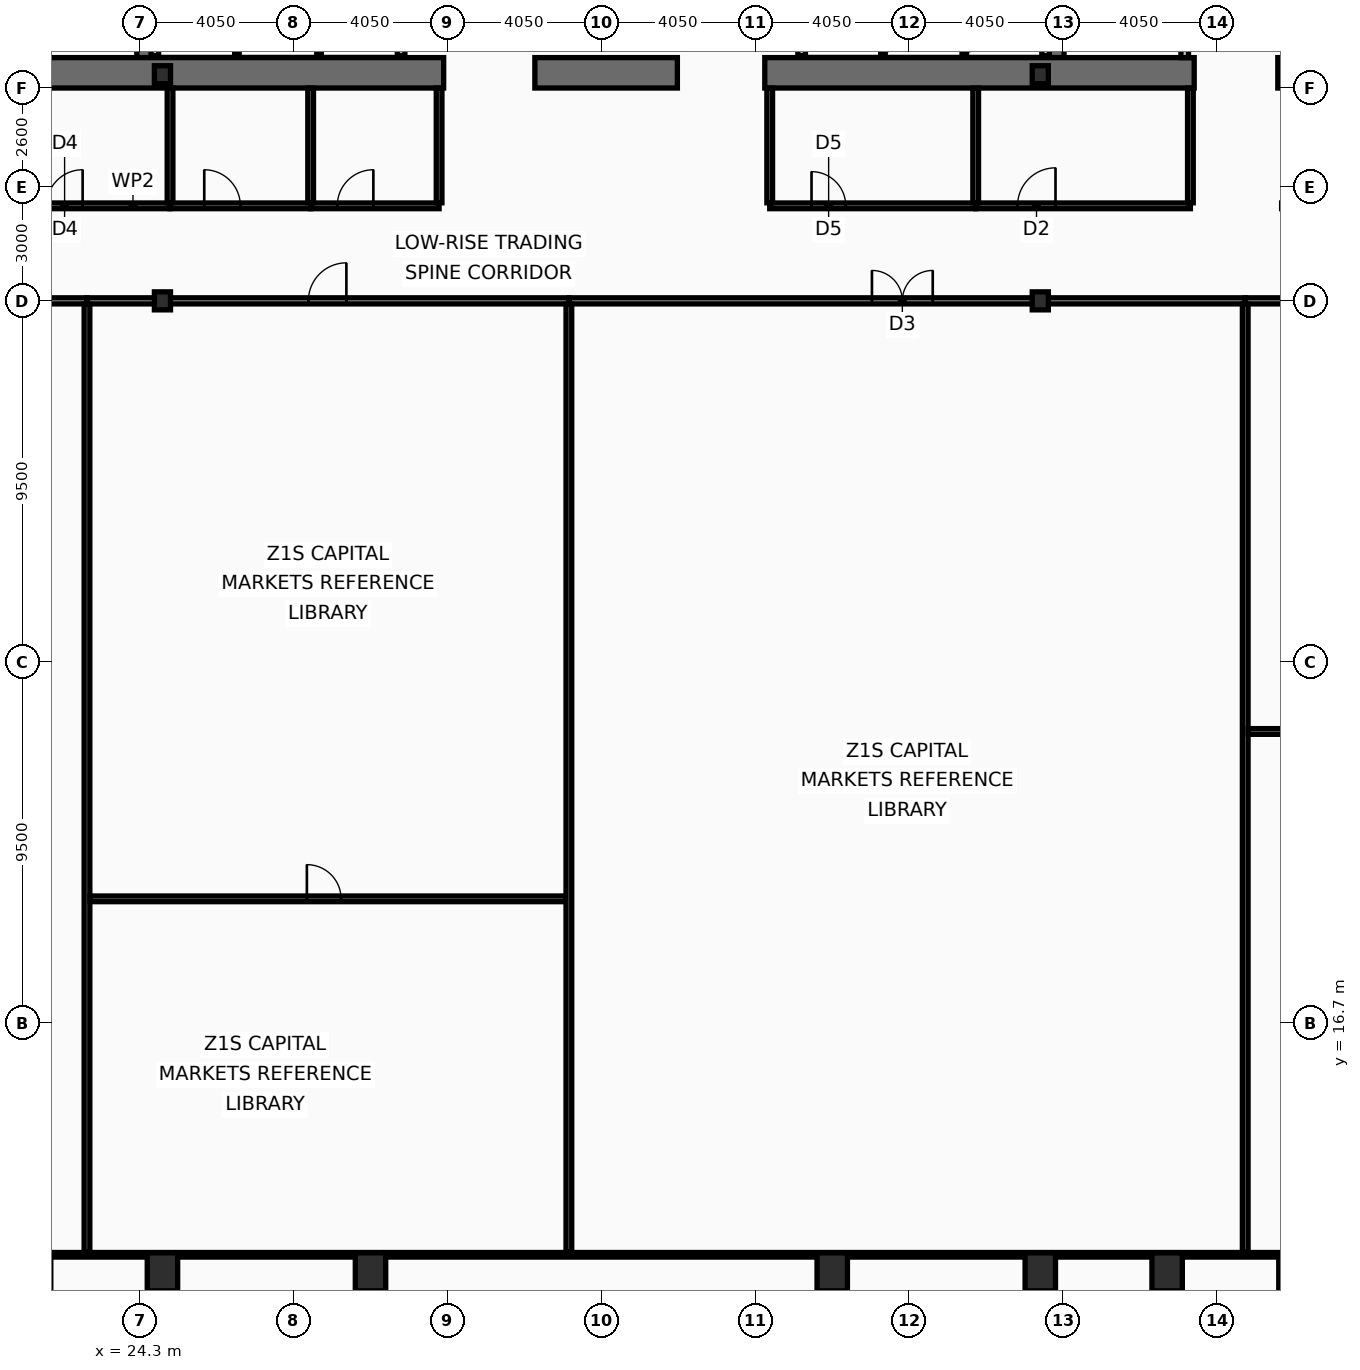
"""IFC4 building model, lengths in metres.
Left out: names, types, materials, properties, quantities, classifications, styles, units other than length and angle.
Written with IfcOpenShell. Run it as: python <this file> out.ifc"""

import sys

from ifc_helpers import new_model, si_unit, direction, frame, frame_2d, origin, origin_2d, place, context, subcontext, project, spatial, rectangle, hollow_rectangle, i_section, extrude, element, fill, save


model = new_model("IFC4")
c1 = context("Model", 3, precision=1e-05, world=origin(), true_north=direction((0.0, 1.0)))
c2 = subcontext(c1, "Body", "Model", "MODEL_VIEW")
j1 = project(units=[si_unit("LENGTHUNIT", "METRE"), si_unit("PLANEANGLEUNIT", "RADIAN")], contexts=[c1])
p1 = place(None, origin())
s1 = spatial("IfcSite", under=j1, at=p1, CompositionType="ELEMENT")
p2 = place(p1, origin())
s2 = spatial("IfcBuilding", under=s1, at=p2, CompositionType="ELEMENT")
p3 = place(p2, frame((0.0, 0.0, 49.8)))
s3 = spatial("IfcBuildingStorey", under=s2, at=p3, CompositionType="ELEMENT", Elevation=49.8)
for number, where, z_axis, x_axis in (
    (1, (24.45, 42.1, 0.0), (0.0, 0.0, 1.0), (0.0, 1.0, 0.0)),
    (2, (48.4, 42.1, 0.0), (0.0, 0.0, 1.0), (0.0, 1.0, 0.0)),
):
    element("IfcWall", number, at=place(p3, frame(where, z_axis=z_axis, x_axis=x_axis)), inside=s3, PredefinedType="SHEAR", context=c2, shape_type="SweptSolid", body=[
        extrude(rectangle(XDim=10.8, YDim=0.45, at=frame_2d((5.4, 0.0))), origin(), (0.0, 0.0, 1.0), 3.82),
    ])
p4 = place(p3, frame((32.3, 41.7, 0.0), z_axis=(0.0, 0.0, 1.0), x_axis=(-1.0, 0.0, 0.0)))
e3 = element("IfcWall", 3, at=p4, inside=s3, PredefinedType="SHEAR", context=c2, shape_type="SweptSolid", body=[
    extrude(rectangle(XDim=11.45, YDim=0.8, at=frame_2d((5.725, 0.0))), origin(), (0.0, 0.0, 1.0), 3.82),
])
p5 = place(p3, frame((38.45, 41.7, 0.0), z_axis=(0.0, 0.0, 1.0), x_axis=(-1.0, 0.0, 0.0)))
e4 = element("IfcWall", 4, at=p5, inside=s3, PredefinedType="SHEAR", context=c2, shape_type="SweptSolid", body=[
    extrude(rectangle(XDim=3.75, YDim=0.8, at=frame_2d((1.875, 0.0))), origin(), (0.0, 0.0, 1.0), 3.82),
])
p6 = place(p3, frame((52.05, 41.7, 0.0), z_axis=(0.0, 0.0, 1.0), x_axis=(-1.0, 0.0, 0.0)))
e5 = element("IfcWall", 5, at=p6, inside=s3, PredefinedType="SHEAR", context=c2, shape_type="SweptSolid", body=[
    extrude(rectangle(XDim=11.3, YDim=0.8, at=frame_2d((5.65, 0.0))), origin(), (0.0, 0.0, 1.0), 3.82),
])
p7 = place(p3, frame((56.7, 41.7, 0.0), z_axis=(0.0, 0.0, 1.0), x_axis=(-1.0, 0.0, 0.0)))
e6 = element("IfcWall", 6, at=p7, inside=s3, PredefinedType="SHEAR", context=c2, shape_type="SweptSolid", body=[
    extrude(rectangle(XDim=2.45, YDim=0.8, at=frame_2d((1.225, 0.0))), origin(), (0.0, 0.0, 1.0), 3.82),
])
for number, where, z_axis, x_axis in (
    (7, (24.9, 10.15, 0.0), (0.0, 0.0, 1.0), (1.0, 0.0, 0.0)),
    (8, (30.375, 10.15, 0.0), (0.0, 0.0, 1.0), (1.0, 0.0, 0.0)),
    (9, (42.525, 10.15, 0.0), (0.0, 0.0, 1.0), (1.0, 0.0, 0.0)),
    (10, (48.0, 10.15, 0.0), (0.0, 0.0, 1.0), (1.0, 0.0, 0.0)),
    (11, (51.337, 10.15, 0.0), (0.0, 0.0, 1.0), (1.0, 0.0, 0.0)),
    (12, (54.675, 10.15, 0.0), (0.0, 0.0, 1.0), (1.0, 0.0, 0.0)),
):
    element("IfcColumn", number, at=place(p3, frame(where, z_axis=z_axis, x_axis=x_axis)), inside=s3, PredefinedType="COLUMN", context=c2, shape_type="SweptSolid", body=[
        extrude(hollow_rectangle(XDim=0.8, YDim=1.0, WallThickness=0.055, at=origin_2d()), origin(), (0.0, 0.0, 1.0), 4.0),
    ])
for number, where, z_axis, x_axis in (
    (13, (24.9, 35.7, 0.0), (0.0, 0.0, 1.0), (1.0, 0.0, 0.0)),
    (14, (24.9, 41.65, 0.0), (0.0, 0.0, 1.0), (1.0, 0.0, 0.0)),
    (15, (48.0, 35.7, 0.0), (0.0, 0.0, 1.0), (1.0, 0.0, 0.0)),
    (16, (48.0, 41.65, 0.0), (0.0, 0.0, 1.0), (1.0, 0.0, 0.0)),
):
    element("IfcColumn", number, at=place(p3, frame(where, z_axis=z_axis, x_axis=x_axis)), inside=s3, PredefinedType="COLUMN", context=c2, shape_type="SweptSolid", body=[
        extrude(i_section(OverallWidth=0.424, OverallDepth=0.474, WebThickness=0.048, FlangeThickness=0.077, at=origin_2d()), origin(), (0.0, 0.0, 1.0), 4.0),
    ])
p8 = place(p3, frame((51.8, 42.1, 0.0), z_axis=(0.0, 0.0, 1.0), x_axis=(0.0, 1.0, 0.0)))
e17 = element("IfcWall", 17, at=p8, inside=s3, PredefinedType="PARTITIONING", context=c2, shape_type="SweptSolid", body=[
    extrude(rectangle(XDim=2.395, YDim=0.2, at=frame_2d((1.198, 0.0))), origin(), (0.0, 0.0, 1.0), 3.82),
])
p9 = place(p8, frame((0.38, 0.0, 0.0)))
e18 = element("IfcOpeningElement", 18, at=p9, cuts=e17, PredefinedType="OPENING", context=c2, shape_type="SweptSolid", body=[
    extrude(rectangle(XDim=1.05, YDim=2.15, at=frame_2d((0.525, 1.075))), frame((0.0, 0.11, 0.0), z_axis=(0.0, -1.0, 0.0), x_axis=(1.0, 0.0, 0.0)), (0.0, 0.0, 1.0), 0.22),
])
for number, where, z_axis, x_axis in (
    (19, (24.7, 42.15, 0.0), (0.0, 0.0, 1.0), (0.0, 1.0, 0.0)),
    (20, (31.18, 42.15, 0.0), (0.0, 0.0, 1.0), (0.0, 1.0, 0.0)),
):
    element("IfcWall", number, at=place(p3, frame(where, z_axis=z_axis, x_axis=x_axis)), inside=s3, PredefinedType="PARTITIONING", context=c2, shape_type="SweptSolid", body=[
        extrude(rectangle(XDim=2.095, YDim=0.2, at=frame_2d((1.048, 0.0))), origin(), (0.0, 0.0, 1.0), 3.82),
    ])
for number, where, z_axis, x_axis in (
    (21, (26.86, 42.15, 0.0), (0.0, 0.0, 1.0), (0.0, 1.0, 0.0)),
    (22, (29.02, 42.15, 0.0), (0.0, 0.0, 1.0), (0.0, 1.0, 0.0)),
):
    element("IfcWall", number, at=place(p3, frame(where, z_axis=z_axis, x_axis=x_axis)), inside=s3, PredefinedType="PARTITIONING", context=c2, shape_type="SweptSolid", body=[
        extrude(rectangle(XDim=2.095, YDim=0.12, at=frame_2d((1.048, 0.0))), origin(), (0.0, 0.0, 1.0), 3.82),
    ])
for number, where, z_axis, x_axis in (
    (23, (41.72, 42.15, 0.0), (0.0, 0.0, 1.0), (0.0, 1.0, 0.0)),
    (24, (48.14, 42.15, 0.0), (0.0, 0.0, 1.0), (0.0, 1.0, 0.0)),
):
    element("IfcWall", number, at=place(p3, frame(where, z_axis=z_axis, x_axis=x_axis)), inside=s3, PredefinedType="PARTITIONING", context=c2, shape_type="SweptSolid", body=[
        extrude(rectangle(XDim=2.095, YDim=0.2, at=frame_2d((1.048, 0.0))), origin(), (0.0, 0.0, 1.0), 3.82),
    ])
for number, where, z_axis, x_axis in (
    (25, (43.86, 42.15, 0.0), (0.0, 0.0, 1.0), (0.0, 1.0, 0.0)),
    (26, (46.0, 42.15, 0.0), (0.0, 0.0, 1.0), (0.0, 1.0, 0.0)),
):
    element("IfcWall", number, at=place(p3, frame(where, z_axis=z_axis, x_axis=x_axis)), inside=s3, PredefinedType="PARTITIONING", context=c2, shape_type="SweptSolid", body=[
        extrude(rectangle(XDim=2.095, YDim=0.12, at=frame_2d((1.048, 0.0))), origin(), (0.0, 0.0, 1.0), 3.82),
    ])
p10 = place(p3, frame((20.95, 38.2, 0.0), z_axis=(0.0, 0.0, 1.0), x_axis=(1.0, 0.0, 0.0)))
e27 = element("IfcWall", 27, at=p10, inside=s3, PredefinedType="PARTITIONING", context=c2, shape_type="SweptSolid", body=[
    extrude(rectangle(XDim=4.15, YDim=0.15, at=frame_2d((2.075, 0.0))), origin(), (0.0, 0.0, 1.0), 3.01),
])
p11 = place(p10, frame((0.9, 0.0, 0.0)))
e28 = element("IfcOpeningElement", 28, at=p11, cuts=e27, PredefinedType="OPENING", context=c2, shape_type="SweptSolid", body=[
    extrude(rectangle(XDim=0.95, YDim=2.05, at=frame_2d((0.475, 1.025))), frame((0.0, 0.085, 0.0), z_axis=(0.0, -1.0, 0.0), x_axis=(1.0, 0.0, 0.0)), (0.0, 0.0, 1.0), 0.17),
])
p12 = place(p3, frame((25.1, 38.2, 0.0), z_axis=(0.0, 0.0, 1.0), x_axis=(1.0, 0.0, 0.0)))
e29 = element("IfcWall", 29, at=p12, inside=s3, PredefinedType="PARTITIONING", context=c2, shape_type="SweptSolid", body=[
    extrude(rectangle(XDim=3.7, YDim=0.15, at=frame_2d((1.85, 0.0))), origin(), (0.0, 0.0, 1.0), 3.01),
])
p13 = place(p12, frame((0.9, 0.0, 0.0)))
e30 = element("IfcOpeningElement", 30, at=p13, cuts=e29, PredefinedType="OPENING", context=c2, shape_type="SweptSolid", body=[
    extrude(rectangle(XDim=0.95, YDim=2.05, at=frame_2d((0.475, 1.025))), frame((0.0, 0.085, 0.0), z_axis=(0.0, -1.0, 0.0), x_axis=(1.0, 0.0, 0.0)), (0.0, 0.0, 1.0), 0.17),
])
p14 = place(p3, frame((28.8, 38.2, 0.0), z_axis=(0.0, 0.0, 1.0), x_axis=(1.0, 0.0, 0.0)))
e31 = element("IfcWall", 31, at=p14, inside=s3, PredefinedType="PARTITIONING", context=c2, shape_type="SweptSolid", body=[
    extrude(rectangle(XDim=3.38, YDim=0.15, at=frame_2d((1.69, 0.0))), origin(), (0.0, 0.0, 1.0), 3.01),
])
p15 = place(p14, frame((0.7, 0.0, 0.0)))
e32 = element("IfcOpeningElement", 32, at=p15, cuts=e31, PredefinedType="OPENING", context=c2, shape_type="SweptSolid", body=[
    extrude(rectangle(XDim=0.95, YDim=2.05, at=frame_2d((0.475, 1.025))), frame((0.0, 0.085, 0.0), z_axis=(0.0, -1.0, 0.0), x_axis=(1.0, 0.0, 0.0)), (0.0, 0.0, 1.0), 0.17),
])
p16 = place(p3, frame((25.1, 38.28, 0.0), z_axis=(0.0, 0.0, 1.0), x_axis=(0.0, 1.0, 0.0)))
e33 = element("IfcWall", 33, at=p16, inside=s3, PredefinedType="PARTITIONING", context=c2, shape_type="SweptSolid", body=[
    extrude(rectangle(XDim=3.02, YDim=0.15, at=frame_2d((1.51, 0.0))), origin(), (0.0, 0.0, 1.0), 3.01),
])
for number, where, z_axis, x_axis in (
    (34, (28.8, 38.28, 0.0), (0.0, 0.0, 1.0), (0.0, 1.0, 0.0)),
    (35, (32.18, 38.28, 0.0), (0.0, 0.0, 1.0), (0.0, 1.0, 0.0)),
):
    element("IfcWall", number, at=place(p3, frame(where, z_axis=z_axis, x_axis=x_axis)), inside=s3, PredefinedType="PARTITIONING", context=c2, shape_type="SweptSolid", body=[
        extrude(rectangle(XDim=3.02, YDim=0.15, at=frame_2d((1.51, 0.0))), origin(), (0.0, 0.0, 1.0), 3.82),
    ])
p17 = place(p3, frame((40.88, 38.2, 0.0), z_axis=(0.0, 0.0, 1.0), x_axis=(1.0, 0.0, 0.0)))
e36 = element("IfcWall", 36, at=p17, inside=s3, PredefinedType="PARTITIONING", context=c2, shape_type="SweptSolid", body=[
    extrude(rectangle(XDim=5.42, YDim=0.15, at=frame_2d((2.71, 0.0))), origin(), (0.0, 0.0, 1.0), 3.01),
])
p18 = place(p17, frame((1.1, 0.0, 0.0)))
e37 = element("IfcOpeningElement", 37, at=p18, cuts=e36, PredefinedType="OPENING", context=c2, shape_type="SweptSolid", body=[
    extrude(rectangle(XDim=0.9, YDim=2.05, at=frame_2d((0.45, 1.025))), frame((0.0, 0.085, 0.0), z_axis=(0.0, -1.0, 0.0), x_axis=(1.0, 0.0, 0.0)), (0.0, 0.0, 1.0), 0.17),
])
p19 = place(p3, frame((46.3, 38.2, 0.0), z_axis=(0.0, 0.0, 1.0), x_axis=(1.0, 0.0, 0.0)))
e38 = element("IfcWall", 38, at=p19, inside=s3, PredefinedType="PARTITIONING", context=c2, shape_type="SweptSolid", body=[
    extrude(rectangle(XDim=5.65, YDim=0.15, at=frame_2d((2.825, 0.0))), origin(), (0.0, 0.0, 1.0), 3.01),
])
p20 = place(p19, frame((1.1, 0.0, 0.0)))
e39 = element("IfcOpeningElement", 39, at=p20, cuts=e38, PredefinedType="OPENING", context=c2, shape_type="SweptSolid", body=[
    extrude(rectangle(XDim=1.0, YDim=2.05, at=frame_2d((0.5, 1.025))), frame((0.0, 0.085, 0.0), z_axis=(0.0, -1.0, 0.0), x_axis=(1.0, 0.0, 0.0)), (0.0, 0.0, 1.0), 0.17),
])
for number, where, z_axis, x_axis in (
    (40, (40.88, 38.28, 0.0), (0.0, 0.0, 1.0), (0.0, 1.0, 0.0)),
    (41, (46.3, 38.28, 0.0), (0.0, 0.0, 1.0), (0.0, 1.0, 0.0)),
    (42, (51.95, 38.28, 0.0), (0.0, 0.0, 1.0), (0.0, 1.0, 0.0)),
):
    element("IfcWall", number, at=place(p3, frame(where, z_axis=z_axis, x_axis=x_axis)), inside=s3, PredefinedType="PARTITIONING", context=c2, shape_type="SweptSolid", body=[
        extrude(rectangle(XDim=3.02, YDim=0.15, at=frame_2d((1.51, 0.0))), origin(), (0.0, 0.0, 1.0), 3.82),
    ])
p21 = place(p3, frame((10.4, 35.7, 0.0), z_axis=(0.0, 0.0, 1.0), x_axis=(1.0, 0.0, 0.0)))
e43 = element("IfcWall", 43, at=p21, inside=s3, PredefinedType="PARTITIONING", context=c2, shape_type="SweptSolid", body=[
    extrude(rectangle(XDim=12.514, YDim=0.16, at=frame_2d((6.257, 0.0))), origin(), (0.0, 0.0, 1.0), 3.01),
])
p22 = place(p21, frame((5.756, 0.0, 0.0)))
e44 = element("IfcOpeningElement", 44, at=p22, cuts=e43, PredefinedType="OPENING", context=c2, shape_type="SweptSolid", body=[
    extrude(rectangle(XDim=1.0, YDim=2.05, at=frame_2d((0.5, 1.025))), frame((0.0, 0.09, 0.0), z_axis=(0.0, -1.0, 0.0), x_axis=(1.0, 0.0, 0.0)), (0.0, 0.0, 1.0), 0.18),
])
p23 = place(p3, frame((22.914, 35.7, 0.0), z_axis=(0.0, 0.0, 1.0), x_axis=(1.0, 0.0, 0.0)))
e45 = element("IfcWall", 45, at=p23, inside=s3, PredefinedType="PARTITIONING", context=c2, shape_type="SweptSolid", body=[
    extrude(rectangle(XDim=12.681, YDim=0.16, at=frame_2d((6.34, 0.0))), origin(), (0.0, 0.0, 1.0), 3.01),
])
p24 = place(p23, frame((5.826, 0.0, 0.0)))
e46 = element("IfcOpeningElement", 46, at=p24, cuts=e45, PredefinedType="OPENING", context=c2, shape_type="SweptSolid", body=[
    extrude(rectangle(XDim=1.0, YDim=2.05, at=frame_2d((0.5, 1.025))), frame((0.0, 0.09, 0.0), z_axis=(0.0, -1.0, 0.0), x_axis=(1.0, 0.0, 0.0)), (0.0, 0.0, 1.0), 0.18),
])
p25 = place(p3, frame((22.914, 10.665, 0.0), z_axis=(0.0, 0.0, 1.0), x_axis=(0.0, 1.0, 0.0)))
e47 = element("IfcWall", 47, at=p25, inside=s3, PredefinedType="PARTITIONING", context=c2, shape_type="SweptSolid", body=[
    extrude(rectangle(XDim=24.95, YDim=0.15, at=frame_2d((12.475, 0.0))), origin(), (0.0, 0.0, 1.0), 3.21),
])
p26 = place(p3, frame((22.994, 19.966, 0.0), z_axis=(0.0, 0.0, 1.0), x_axis=(1.0, 0.0, 0.0)))
e48 = element("IfcWall", 48, at=p26, inside=s3, PredefinedType="PARTITIONING", context=c2, shape_type="SweptSolid", body=[
    extrude(rectangle(XDim=12.521, YDim=0.15, at=frame_2d((6.26, 0.0))), origin(), (0.0, 0.0, 1.0), 3.01),
])
p27 = place(p26, frame((5.706, 0.0, 0.0)))
e49 = element("IfcOpeningElement", 49, at=p27, cuts=e48, PredefinedType="OPENING", context=c2, shape_type="SweptSolid", body=[
    extrude(rectangle(XDim=0.9, YDim=2.05, at=frame_2d((0.45, 1.025))), frame((0.0, 0.085, 0.0), z_axis=(0.0, -1.0, 0.0), x_axis=(1.0, 0.0, 0.0)), (0.0, 0.0, 1.0), 0.17),
])
p28 = place(p3, frame((35.595, 35.7, 0.0), z_axis=(0.0, 0.0, 1.0), x_axis=(1.0, 0.0, 0.0)))
e50 = element("IfcWall", 50, at=p28, inside=s3, PredefinedType="PARTITIONING", context=c2, shape_type="SweptSolid", body=[
    extrude(rectangle(XDim=17.797, YDim=0.16, at=frame_2d((8.899, 0.0))), origin(), (0.0, 0.0, 1.0), 3.01),
])
p29 = place(p28, frame((7.975, 0.0, 0.0)))
e51 = element("IfcOpeningElement", 51, at=p29, cuts=e50, PredefinedType="OPENING", context=c2, shape_type="SweptSolid", body=[
    extrude(rectangle(XDim=1.6, YDim=2.15, at=frame_2d((0.8, 1.075))), frame((0.0, 0.09, 0.0), z_axis=(0.0, -1.0, 0.0), x_axis=(1.0, 0.0, 0.0)), (0.0, 0.0, 1.0), 0.18),
])
p30 = place(p3, frame((35.595, 10.665, 0.0), z_axis=(0.0, 0.0, 1.0), x_axis=(0.0, 1.0, 0.0)))
e52 = element("IfcWall", 52, at=p30, inside=s3, PredefinedType="PARTITIONING", context=c2, shape_type="SweptSolid", body=[
    extrude(rectangle(XDim=24.95, YDim=0.15, at=frame_2d((12.475, 0.0))), origin(), (0.0, 0.0, 1.0), 3.21),
])
p31 = place(p3, frame((53.392, 35.7, 0.0), z_axis=(0.0, 0.0, 1.0), x_axis=(1.0, 0.0, 0.0)))
e53 = element("IfcWall", 53, at=p31, inside=s3, PredefinedType="PARTITIONING", context=c2, shape_type="SweptSolid", body=[
    extrude(rectangle(XDim=8.51, YDim=0.16, at=frame_2d((4.255, 0.0))), origin(), (0.0, 0.0, 1.0), 3.01),
])
p32 = place(p31, frame((4.074, 0.0, 0.0)))
e54 = element("IfcOpeningElement", 54, at=p32, cuts=e53, PredefinedType="OPENING", context=c2, shape_type="SweptSolid", body=[
    extrude(rectangle(XDim=1.0, YDim=2.05, at=frame_2d((0.5, 1.025))), frame((0.0, 0.09, 0.0), z_axis=(0.0, -1.0, 0.0), x_axis=(1.0, 0.0, 0.0)), (0.0, 0.0, 1.0), 0.18),
])
p33 = place(p3, frame((53.392, 10.665, 0.0), z_axis=(0.0, 0.0, 1.0), x_axis=(0.0, 1.0, 0.0)))
e55 = element("IfcWall", 55, at=p33, inside=s3, PredefinedType="PARTITIONING", context=c2, shape_type="SweptSolid", body=[
    extrude(rectangle(XDim=24.95, YDim=0.15, at=frame_2d((12.475, 0.0))), origin(), (0.0, 0.0, 1.0), 3.21),
])
p34 = place(p3, frame((53.472, 24.369, 0.0), z_axis=(0.0, 0.0, 1.0), x_axis=(1.0, 0.0, 0.0)))
e56 = element("IfcWall", 56, at=p34, inside=s3, PredefinedType="PARTITIONING", context=c2, shape_type="SweptSolid", body=[
    extrude(rectangle(XDim=8.349, YDim=0.15, at=frame_2d((4.175, 0.0))), origin(), (0.0, 0.0, 1.0), 3.01),
])
p35 = place(p34, frame((3.829, 0.0, 0.0)))
e57 = element("IfcOpeningElement", 57, at=p35, cuts=e56, PredefinedType="OPENING", context=c2, shape_type="SweptSolid", body=[
    extrude(rectangle(XDim=0.9, YDim=2.05, at=frame_2d((0.45, 1.025))), frame((0.0, 0.085, 0.0), z_axis=(0.0, -1.0, 0.0), x_axis=(1.0, 0.0, 0.0)), (0.0, 0.0, 1.0), 0.17),
])
p36 = place(p3, frame((2.095, 10.6, 0.0), z_axis=(0.0, 0.0, 1.0), x_axis=(1.0, 0.0, 0.0)))
e58 = element("IfcWall", 58, at=p36, inside=s3, PredefinedType="PARTITIONING", context=c2, shape_type="SweptSolid", body=[
    extrude(rectangle(XDim=68.71, YDim=0.12, at=frame_2d((34.355, 0.0))), origin(), (0.0, 0.0, 1.0), 3.01),
])
p37 = place(p11, origin())
e59 = element("IfcDoor", 59, at=p37, inside=s3, OperationType="SINGLE_SWING_RIGHT", PredefinedType="DOOR", context=c2, shape_type="SweptSolid", body=[
    extrude(rectangle(XDim=0.95, YDim=2.05, at=frame_2d((0.475, 1.025))), frame((0.0, 0.025, 0.0), z_axis=(0.0, -1.0, 0.0), x_axis=(1.0, 0.0, 0.0)), (0.0, 0.0, 1.0), 0.05),
])
fill(e28, e59)
p38 = place(p13, origin())
e60 = element("IfcDoor", 60, at=p38, inside=s3, OperationType="SINGLE_SWING_LEFT", PredefinedType="DOOR", context=c2, shape_type="SweptSolid", body=[
    extrude(rectangle(XDim=0.95, YDim=2.05, at=frame_2d((0.475, 1.025))), frame((0.0, 0.025, 0.0), z_axis=(0.0, -1.0, 0.0), x_axis=(1.0, 0.0, 0.0)), (0.0, 0.0, 1.0), 0.05),
])
fill(e30, e60)
p39 = place(p15, origin())
e61 = element("IfcDoor", 61, at=p39, inside=s3, OperationType="SINGLE_SWING_RIGHT", PredefinedType="DOOR", context=c2, shape_type="SweptSolid", body=[
    extrude(rectangle(XDim=0.95, YDim=2.05, at=frame_2d((0.475, 1.025))), frame((0.0, 0.025, 0.0), z_axis=(0.0, -1.0, 0.0), x_axis=(1.0, 0.0, 0.0)), (0.0, 0.0, 1.0), 0.05),
])
fill(e32, e61)
p40 = place(p18, origin())
e62 = element("IfcDoor", 62, at=p40, inside=s3, OperationType="SINGLE_SWING_LEFT", PredefinedType="DOOR", context=c2, shape_type="SweptSolid", body=[
    extrude(rectangle(XDim=0.9, YDim=2.05, at=frame_2d((0.45, 1.025))), frame((0.0, 0.025, 0.0), z_axis=(0.0, -1.0, 0.0), x_axis=(1.0, 0.0, 0.0)), (0.0, 0.0, 1.0), 0.05),
])
fill(e37, e62)
p41 = place(p20, origin())
e63 = element("IfcDoor", 63, at=p41, inside=s3, OperationType="SINGLE_SWING_RIGHT", PredefinedType="DOOR", context=c2, shape_type="SweptSolid", body=[
    extrude(rectangle(XDim=1.0, YDim=2.05, at=frame_2d((0.5, 1.025))), frame((0.0, 0.025, 0.0), z_axis=(0.0, -1.0, 0.0), x_axis=(1.0, 0.0, 0.0)), (0.0, 0.0, 1.0), 0.05),
])
fill(e39, e63)
p42 = place(p24, origin())
e64 = element("IfcDoor", 64, at=p42, inside=s3, OperationType="SINGLE_SWING_RIGHT", PredefinedType="DOOR", context=c2, shape_type="SweptSolid", body=[
    extrude(rectangle(XDim=1.0, YDim=2.05, at=frame_2d((0.5, 1.025))), frame((0.0, 0.025, 0.0), z_axis=(0.0, -1.0, 0.0), x_axis=(1.0, 0.0, 0.0)), (0.0, 0.0, 1.0), 0.05),
])
fill(e46, e64)
p43 = place(p27, origin())
e65 = element("IfcDoor", 65, at=p43, inside=s3, OperationType="SINGLE_SWING_LEFT", PredefinedType="DOOR", context=c2, shape_type="SweptSolid", body=[
    extrude(rectangle(XDim=0.9, YDim=2.05, at=frame_2d((0.45, 1.025))), frame((0.0, 0.025, 0.0), z_axis=(0.0, -1.0, 0.0), x_axis=(1.0, 0.0, 0.0)), (0.0, 0.0, 1.0), 0.05),
])
fill(e49, e65)
p44 = place(p29, origin())
e66 = element("IfcDoor", 66, at=p44, inside=s3, OperationType="DOUBLE_DOOR_SINGLE_SWING", PredefinedType="DOOR", context=c2, shape_type="SweptSolid", body=[
    extrude(rectangle(XDim=1.6, YDim=2.15, at=frame_2d((0.8, 1.075))), frame((0.0, 0.025, 0.0), z_axis=(0.0, -1.0, 0.0), x_axis=(1.0, 0.0, 0.0)), (0.0, 0.0, 1.0), 0.05),
])
fill(e51, e66)
save(model, sys.argv[1])
